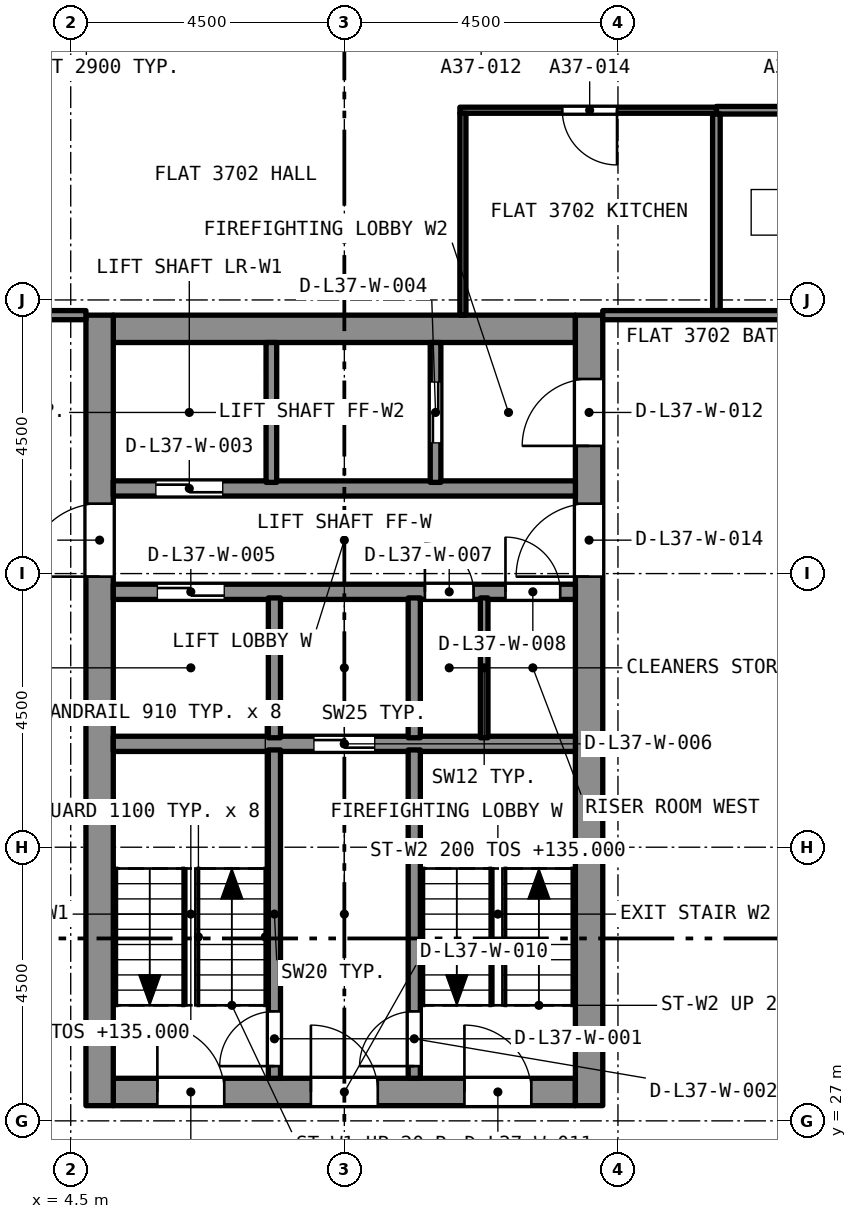
"""IFC4 building model, lengths in metres.
Left out: names, types, materials, properties, quantities, classifications, styles, units other than length and angle.
Written with IfcOpenShell. Run it as: python <this file> out.ifc"""

import sys

from ifc_helpers import new_model, si_unit, direction, frame, frame_2d, origin, place, context, subcontext, project, spatial, rectangle, extrude, element, fill, save


model = new_model("IFC4")
c1 = context("Model", 3, precision=1e-05, world=origin(), true_north=direction((0.0, 1.0)))
c2 = subcontext(c1, "Body", "Model", "MODEL_VIEW")
j1 = project(units=[si_unit("LENGTHUNIT", "METRE"), si_unit("PLANEANGLEUNIT", "RADIAN")], contexts=[c1])
p1 = place(None, origin())
s1 = spatial("IfcSite", under=j1, at=p1, CompositionType="ELEMENT")
p2 = place(p1, origin())
s2 = spatial("IfcBuilding", under=s1, at=p2, CompositionType="ELEMENT")
p3 = place(p2, frame((0.0, 0.0, 133.4)))
s3 = spatial("IfcBuildingStorey", under=s2, at=p3, CompositionType="ELEMENT", Elevation=133.4)
p4 = place(p3, frame((5.2, 27.475, 0.0), z_axis=(0.0, 0.0, 1.0), x_axis=(1.0, 0.0, 0.0)))
e1 = element("IfcWall", 1, at=p4, inside=s3, PredefinedType="SOLIDWALL", context=c2, shape_type="SweptSolid", body=[
    extrude(rectangle(XDim=7.6, YDim=0.45, at=frame_2d((3.8, 0.0))), origin(), (0.0, 0.0, 1.0), 3.2),
])
p5 = place(p4, frame((0.725, 0.0, 0.0)))
e2 = element("IfcOpeningElement", 2, at=p5, cuts=e1, PredefinedType="OPENING", context=c2, shape_type="SweptSolid", body=[
    extrude(rectangle(XDim=1.1, YDim=2.1, at=frame_2d((0.55, 1.05))), frame((0.0, 0.235, 0.0), z_axis=(0.0, -1.0, 0.0), x_axis=(1.0, 0.0, 0.0)), (0.0, 0.0, 1.0), 0.47),
])
p6 = place(p4, frame((3.25, 0.0, 0.0)))
e3 = element("IfcOpeningElement", 3, at=p6, cuts=e1, PredefinedType="OPENING", context=c2, shape_type="SweptSolid", body=[
    extrude(rectangle(XDim=1.1, YDim=2.1, at=frame_2d((0.55, 1.05))), frame((0.0, 0.235, 0.0), z_axis=(0.0, -1.0, 0.0), x_axis=(1.0, 0.0, 0.0)), (0.0, 0.0, 1.0), 0.47),
])
p7 = place(p4, frame((5.775, 0.0, 0.0)))
e4 = element("IfcOpeningElement", 4, at=p7, cuts=e1, PredefinedType="OPENING", context=c2, shape_type="SweptSolid", body=[
    extrude(rectangle(XDim=1.1, YDim=2.1, at=frame_2d((0.55, 1.05))), frame((0.0, 0.235, 0.0), z_axis=(0.0, -1.0, 0.0), x_axis=(1.0, 0.0, 0.0)), (0.0, 0.0, 1.0), 0.47),
])
p8 = place(p3, frame((5.2, 40.025, 0.0), z_axis=(0.0, 0.0, 1.0), x_axis=(1.0, 0.0, 0.0)))
e5 = element("IfcWall", 5, at=p8, inside=s3, PredefinedType="SOLIDWALL", context=c2, shape_type="SweptSolid", body=[
    extrude(rectangle(XDim=7.6, YDim=0.45, at=frame_2d((3.8, 0.0))), origin(), (0.0, 0.0, 1.0), 3.2),
])
p9 = place(p3, frame((4.975, 27.25, 0.0), z_axis=(0.0, 0.0, 1.0), x_axis=(0.0, 1.0, 0.0)))
e6 = element("IfcWall", 6, at=p9, inside=s3, PredefinedType="SOLIDWALL", context=c2, shape_type="SweptSolid", body=[
    extrude(rectangle(XDim=13.0, YDim=0.45, at=frame_2d((6.5, 0.0))), origin(), (0.0, 0.0, 1.0), 3.2),
])
p10 = place(p9, frame((8.7, 0.0, 0.0)))
e7 = element("IfcOpeningElement", 7, at=p10, cuts=e6, PredefinedType="OPENING", context=c2, shape_type="SweptSolid", body=[
    extrude(rectangle(XDim=1.2, YDim=2.1, at=frame_2d((0.6, 1.05))), frame((0.0, 0.235, 0.0), z_axis=(0.0, -1.0, 0.0), x_axis=(1.0, 0.0, 0.0)), (0.0, 0.0, 1.0), 0.47),
])
p11 = place(p3, frame((13.025, 27.25, 0.0), z_axis=(0.0, 0.0, 1.0), x_axis=(0.0, 1.0, 0.0)))
e8 = element("IfcWall", 8, at=p11, inside=s3, PredefinedType="SOLIDWALL", context=c2, shape_type="SweptSolid", body=[
    extrude(rectangle(XDim=13.0, YDim=0.45, at=frame_2d((6.5, 0.0))), origin(), (0.0, 0.0, 1.0), 3.2),
])
p12 = place(p11, frame((10.85, 0.0, 0.0)))
e9 = element("IfcOpeningElement", 9, at=p12, cuts=e8, PredefinedType="OPENING", context=c2, shape_type="SweptSolid", body=[
    extrude(rectangle(XDim=1.1, YDim=2.1, at=frame_2d((0.55, 1.05))), frame((0.0, 0.235, 0.0), z_axis=(0.0, -1.0, 0.0), x_axis=(1.0, 0.0, 0.0)), (0.0, 0.0, 1.0), 0.47),
])
p13 = place(p11, frame((8.7, 0.0, 0.0)))
e10 = element("IfcOpeningElement", 10, at=p13, cuts=e8, PredefinedType="OPENING", context=c2, shape_type="SweptSolid", body=[
    extrude(rectangle(XDim=1.2, YDim=2.1, at=frame_2d((0.6, 1.05))), frame((0.0, 0.235, 0.0), z_axis=(0.0, -1.0, 0.0), x_axis=(1.0, 0.0, 0.0)), (0.0, 0.0, 1.0), 0.47),
])
p14 = place(p3, frame((17.9, 43.62, 0.0), z_axis=(0.0, 0.0, 1.0), x_axis=(-1.0, 0.0, 0.0)))
e11 = element("IfcWall", 11, at=p14, inside=s3, PredefinedType="PARTITIONING", context=c2, shape_type="SweptSolid", body=[
    extrude(rectangle(XDim=2.781, YDim=0.125, at=frame_2d((1.39, 0.0))), origin(), (0.0, 0.0, 1.0), 2.9),
])
p15 = place(p14, frame((0.94, 0.0, 0.0)))
e12 = element("IfcOpeningElement", 12, at=p15, cuts=e11, PredefinedType="OPENING", context=c2, shape_type="SweptSolid", body=[
    extrude(rectangle(XDim=0.8, YDim=2.1, at=frame_2d((0.4, 1.05))), frame((0.0, 0.073, 0.0), z_axis=(0.0, -1.0, 0.0), x_axis=(1.0, 0.0, 0.0)), (0.0, 0.0, 1.0), 0.145),
])
p16 = place(p3, frame((15.119, 40.325, 0.0), z_axis=(0.0, 0.0, 1.0), x_axis=(0.0, 1.0, 0.0)))
e13 = element("IfcWall", 13, at=p16, inside=s3, PredefinedType="PARTITIONING", context=c2, shape_type="SweptSolid", body=[
    extrude(rectangle(XDim=3.233, YDim=0.125, at=frame_2d((1.616, 0.0))), origin(), (0.0, 0.0, 1.0), 2.9),
])
p17 = place(p3, frame((15.119, 43.62, 0.0), z_axis=(0.0, 0.0, 1.0), x_axis=(-1.0, 0.0, 0.0)))
e14 = element("IfcWall", 14, at=p17, inside=s3, PredefinedType="PARTITIONING", context=c2, shape_type="SweptSolid", body=[
    extrude(rectangle(XDim=4.219, YDim=0.1, at=frame_2d((2.11, 0.0))), origin(), (0.0, 0.0, 1.0), 2.9),
])
p18 = place(p17, frame((1.635, 0.0, 0.0)))
e15 = element("IfcOpeningElement", 15, at=p18, cuts=e14, PredefinedType="OPENING", context=c2, shape_type="SweptSolid", body=[
    extrude(rectangle(XDim=0.9, YDim=2.1, at=frame_2d((0.45, 1.05))), frame((0.0, 0.06, 0.0), z_axis=(0.0, -1.0, 0.0), x_axis=(1.0, 0.0, 0.0)), (0.0, 0.0, 1.0), 0.12),
])
p19 = place(p3, frame((10.95, 40.25, 0.0), z_axis=(0.0, 0.0, 1.0), x_axis=(0.0, 1.0, 0.0)))
e16 = element("IfcWall", 16, at=p19, inside=s3, PredefinedType="PARTITIONING", context=c2, shape_type="SweptSolid", body=[
    extrude(rectangle(XDim=3.32, YDim=0.1, at=frame_2d((1.66, 0.0))), origin(), (0.0, 0.0, 1.0), 2.9),
])
p20 = place(p3, frame((0.475, 40.25, 0.0), z_axis=(0.0, 0.0, 1.0), x_axis=(1.0, 0.0, 0.0)))
e17 = element("IfcWall", 17, at=p20, inside=s3, PredefinedType="PARTITIONING", context=c2, shape_type="SweptSolid", body=[
    extrude(rectangle(XDim=4.275, YDim=0.15, at=frame_2d((2.137, 0.0))), origin(), (0.0, 0.0, 1.0), 2.9),
])
p21 = place(p20, frame((1.275, 0.0, 0.0)))
e18 = element("IfcOpeningElement", 18, at=p21, cuts=e17, PredefinedType="OPENING", context=c2, shape_type="SweptSolid", body=[
    extrude(rectangle(XDim=1.0, YDim=2.1, at=frame_2d((0.5, 1.05))), frame((0.0, 0.085, 0.0), z_axis=(0.0, -1.0, 0.0), x_axis=(1.0, 0.0, 0.0)), (0.0, 0.0, 1.0), 0.17),
])
p22 = place(p3, frame((13.25, 40.25, 0.0), z_axis=(0.0, 0.0, 1.0), x_axis=(1.0, 0.0, 0.0)))
e19 = element("IfcWall", 19, at=p22, inside=s3, PredefinedType="PARTITIONING", context=c2, shape_type="SweptSolid", body=[
    extrude(rectangle(XDim=4.275, YDim=0.15, at=frame_2d((2.137, 0.0))), origin(), (0.0, 0.0, 1.0), 2.9),
])
p23 = place(p3, frame((5.2, 33.2, 0.0), z_axis=(0.0, 0.0, 1.0), x_axis=(1.0, 0.0, 0.0)))
e20 = element("IfcWall", 20, at=p23, inside=s3, PredefinedType="SOLIDWALL", context=c2, shape_type="SweptSolid", body=[
    extrude(rectangle(XDim=7.6, YDim=0.25, at=frame_2d((3.8, 0.0))), origin(), (0.0, 0.0, 1.0), 2.9),
])
p24 = place(p23, frame((3.3, 0.0, 0.0)))
e21 = element("IfcOpeningElement", 21, at=p24, cuts=e20, PredefinedType="OPENING", context=c2, shape_type="SweptSolid", body=[
    extrude(rectangle(XDim=1.0, YDim=2.1, at=frame_2d((0.5, 1.05))), frame((0.0, 0.135, 0.0), z_axis=(0.0, -1.0, 0.0), x_axis=(1.0, 0.0, 0.0)), (0.0, 0.0, 1.0), 0.27),
])
p25 = place(p3, frame((5.2, 35.7, 0.0), z_axis=(0.0, 0.0, 1.0), x_axis=(1.0, 0.0, 0.0)))
e22 = element("IfcWall", 22, at=p25, inside=s3, PredefinedType="SOLIDWALL", context=c2, shape_type="SweptSolid", body=[
    extrude(rectangle(XDim=7.6, YDim=0.25, at=frame_2d((3.8, 0.0))), origin(), (0.0, 0.0, 1.0), 2.9),
])
p26 = place(p25, frame((0.725, 0.0, 0.0)))
e23 = element("IfcOpeningElement", 23, at=p26, cuts=e22, PredefinedType="OPENING", context=c2, shape_type="SweptSolid", body=[
    extrude(rectangle(XDim=1.1, YDim=2.4, at=frame_2d((0.55, 1.2))), frame((0.0, 0.135, 0.0), z_axis=(0.0, -1.0, 0.0), x_axis=(1.0, 0.0, 0.0)), (0.0, 0.0, 1.0), 0.27),
])
p27 = place(p25, frame((5.125, 0.0, 0.0)))
e24 = element("IfcOpeningElement", 24, at=p27, cuts=e22, PredefinedType="OPENING", context=c2, shape_type="SweptSolid", body=[
    extrude(rectangle(XDim=0.8, YDim=2.1, at=frame_2d((0.4, 1.05))), frame((0.0, 0.135, 0.0), z_axis=(0.0, -1.0, 0.0), x_axis=(1.0, 0.0, 0.0)), (0.0, 0.0, 1.0), 0.27),
])
p28 = place(p25, frame((6.45, 0.0, 0.0)))
e25 = element("IfcOpeningElement", 25, at=p28, cuts=e22, PredefinedType="OPENING", context=c2, shape_type="SweptSolid", body=[
    extrude(rectangle(XDim=0.9, YDim=2.1, at=frame_2d((0.45, 1.05))), frame((0.0, 0.135, 0.0), z_axis=(0.0, -1.0, 0.0), x_axis=(1.0, 0.0, 0.0)), (0.0, 0.0, 1.0), 0.27),
])
p29 = place(p3, frame((5.2, 37.4, 0.0), z_axis=(0.0, 0.0, 1.0), x_axis=(1.0, 0.0, 0.0)))
e26 = element("IfcWall", 26, at=p29, inside=s3, PredefinedType="SOLIDWALL", context=c2, shape_type="SweptSolid", body=[
    extrude(rectangle(XDim=7.6, YDim=0.25, at=frame_2d((3.8, 0.0))), origin(), (0.0, 0.0, 1.0), 2.9),
])
p30 = place(p29, frame((0.7, 0.0, 0.0)))
e27 = element("IfcOpeningElement", 27, at=p30, cuts=e26, PredefinedType="OPENING", context=c2, shape_type="SweptSolid", body=[
    extrude(rectangle(XDim=1.1, YDim=2.4, at=frame_2d((0.55, 1.2))), frame((0.0, 0.135, 0.0), z_axis=(0.0, -1.0, 0.0), x_axis=(1.0, 0.0, 0.0)), (0.0, 0.0, 1.0), 0.27),
])
p31 = place(p3, frame((7.85, 27.7, 0.0), z_axis=(0.0, 0.0, 1.0), x_axis=(0.0, 1.0, 0.0)))
e28 = element("IfcWall", 28, at=p31, inside=s3, PredefinedType="SOLIDWALL", context=c2, shape_type="SweptSolid", body=[
    extrude(rectangle(XDim=5.4, YDim=0.2, at=frame_2d((2.7, 0.0))), origin(), (0.0, 0.0, 1.0), 2.9),
])
p32 = place(p31, frame((0.2, 0.0, 0.0)))
e29 = element("IfcOpeningElement", 29, at=p32, cuts=e28, PredefinedType="OPENING", context=c2, shape_type="SweptSolid", body=[
    extrude(rectangle(XDim=0.9, YDim=2.1, at=frame_2d((0.45, 1.05))), frame((0.0, 0.11, 0.0), z_axis=(0.0, -1.0, 0.0), x_axis=(1.0, 0.0, 0.0)), (0.0, 0.0, 1.0), 0.22),
])
p33 = place(p3, frame((10.15, 27.7, 0.0), z_axis=(0.0, 0.0, 1.0), x_axis=(0.0, 1.0, 0.0)))
e30 = element("IfcWall", 30, at=p33, inside=s3, PredefinedType="SOLIDWALL", context=c2, shape_type="SweptSolid", body=[
    extrude(rectangle(XDim=5.4, YDim=0.2, at=frame_2d((2.7, 0.0))), origin(), (0.0, 0.0, 1.0), 2.9),
])
p34 = place(p33, frame((0.2, 0.0, 0.0)))
e31 = element("IfcOpeningElement", 31, at=p34, cuts=e30, PredefinedType="OPENING", context=c2, shape_type="SweptSolid", body=[
    extrude(rectangle(XDim=0.9, YDim=2.1, at=frame_2d((0.45, 1.05))), frame((0.0, 0.11, 0.0), z_axis=(0.0, -1.0, 0.0), x_axis=(1.0, 0.0, 0.0)), (0.0, 0.0, 1.0), 0.22),
])
for number, where, z_axis, x_axis in (
    (32, (7.85, 33.3, 0.0), (0.0, 0.0, 1.0), (0.0, 1.0, 0.0)),
    (33, (10.15, 33.3, 0.0), (0.0, 0.0, 1.0), (0.0, 1.0, 0.0)),
):
    element("IfcWall", number, at=place(p3, frame(where, z_axis=z_axis, x_axis=x_axis)), inside=s3, PredefinedType="SOLIDWALL", context=c2, shape_type="SweptSolid", body=[
        extrude(rectangle(XDim=2.3, YDim=0.2, at=frame_2d((1.15, 0.0))), origin(), (0.0, 0.0, 1.0), 2.9),
    ])
p35 = place(p3, frame((7.8, 37.5, 0.0), z_axis=(0.0, 0.0, 1.0), x_axis=(0.0, 1.0, 0.0)))
e34 = element("IfcWall", 34, at=p35, inside=s3, PredefinedType="SOLIDWALL", context=c2, shape_type="SweptSolid", body=[
    extrude(rectangle(XDim=2.3, YDim=0.175, at=frame_2d((1.15, 0.0))), origin(), (0.0, 0.0, 1.0), 2.9),
])
p36 = place(p3, frame((10.5, 37.5, 0.0), z_axis=(0.0, 0.0, 1.0), x_axis=(0.0, 1.0, 0.0)))
e35 = element("IfcWall", 35, at=p36, inside=s3, PredefinedType="SOLIDWALL", context=c2, shape_type="SweptSolid", body=[
    extrude(rectangle(XDim=2.3, YDim=0.175, at=frame_2d((1.15, 0.0))), origin(), (0.0, 0.0, 1.0), 2.9),
])
p37 = place(p36, frame((0.65, 0.0, 0.0)))
e36 = element("IfcOpeningElement", 36, at=p37, cuts=e35, PredefinedType="OPENING", context=c2, shape_type="SweptSolid", body=[
    extrude(rectangle(XDim=1.0, YDim=2.1, at=frame_2d((0.5, 1.05))), frame((0.0, 0.097, 0.0), z_axis=(0.0, -1.0, 0.0), x_axis=(1.0, 0.0, 0.0)), (0.0, 0.0, 1.0), 0.195),
])
p38 = place(p3, frame((11.3, 33.3, 0.0), z_axis=(0.0, 0.0, 1.0), x_axis=(0.0, 1.0, 0.0)))
e37 = element("IfcWall", 37, at=p38, inside=s3, PredefinedType="PARTITIONING", context=c2, shape_type="SweptSolid", body=[
    extrude(rectangle(XDim=2.3, YDim=0.125, at=frame_2d((1.15, 0.0))), origin(), (0.0, 0.0, 1.0), 2.9),
])
p39 = place(p18, origin())
e38 = element("IfcDoor", 38, at=p39, inside=s3, OperationType="SINGLE_SWING_LEFT", PredefinedType="DOOR", context=c2, shape_type="SweptSolid", body=[
    extrude(rectangle(XDim=0.9, YDim=2.1, at=frame_2d((0.45, 1.05))), frame((0.0, 0.025, 0.0), z_axis=(0.0, -1.0, 0.0), x_axis=(1.0, 0.0, 0.0)), (0.0, 0.0, 1.0), 0.05),
])
fill(e15, e38)
p40 = place(p32, origin())
e39 = element("IfcDoor", 39, at=p40, inside=s3, OperationType="SINGLE_SWING_LEFT", PredefinedType="DOOR", context=c2, shape_type="SweptSolid", body=[
    extrude(rectangle(XDim=0.9, YDim=2.1, at=frame_2d((0.45, 1.05))), frame((0.0, 0.025, 0.0), z_axis=(0.0, -1.0, 0.0), x_axis=(1.0, 0.0, 0.0)), (0.0, 0.0, 1.0), 0.05),
])
fill(e29, e39)
p41 = place(p34, origin())
e40 = element("IfcDoor", 40, at=p41, inside=s3, OperationType="SINGLE_SWING_LEFT", PredefinedType="DOOR", context=c2, shape_type="SweptSolid", body=[
    extrude(rectangle(XDim=0.9, YDim=2.1, at=frame_2d((0.45, 1.05))), frame((0.0, 0.025, 0.0), z_axis=(0.0, -1.0, 0.0), x_axis=(1.0, 0.0, 0.0)), (0.0, 0.0, 1.0), 0.05),
])
fill(e31, e40)
p42 = place(p30, origin())
e41 = element("IfcDoor", 41, at=p42, inside=s3, OperationType="SLIDING_TO_LEFT", PredefinedType="DOOR", context=c2, shape_type="SweptSolid", body=[
    extrude(rectangle(XDim=1.1, YDim=2.4, at=frame_2d((0.55, 1.2))), frame((0.0, 0.025, 0.0), z_axis=(0.0, -1.0, 0.0), x_axis=(1.0, 0.0, 0.0)), (0.0, 0.0, 1.0), 0.05),
])
fill(e27, e41)
p43 = place(p37, origin())
e42 = element("IfcDoor", 42, at=p43, inside=s3, OperationType="SLIDING_TO_LEFT", PredefinedType="DOOR", context=c2, shape_type="SweptSolid", body=[
    extrude(rectangle(XDim=1.0, YDim=2.1, at=frame_2d((0.5, 1.05))), frame((0.0, 0.025, 0.0), z_axis=(0.0, -1.0, 0.0), x_axis=(1.0, 0.0, 0.0)), (0.0, 0.0, 1.0), 0.05),
])
fill(e36, e42)
p44 = place(p26, origin())
e43 = element("IfcDoor", 43, at=p44, inside=s3, OperationType="SLIDING_TO_LEFT", PredefinedType="DOOR", context=c2, shape_type="SweptSolid", body=[
    extrude(rectangle(XDim=1.1, YDim=2.4, at=frame_2d((0.55, 1.2))), frame((0.0, 0.025, 0.0), z_axis=(0.0, -1.0, 0.0), x_axis=(1.0, 0.0, 0.0)), (0.0, 0.0, 1.0), 0.05),
])
fill(e23, e43)
p45 = place(p24, origin())
e44 = element("IfcDoor", 44, at=p45, inside=s3, OperationType="SLIDING_TO_LEFT", PredefinedType="DOOR", context=c2, shape_type="SweptSolid", body=[
    extrude(rectangle(XDim=1.0, YDim=2.1, at=frame_2d((0.5, 1.05))), frame((0.0, 0.025, 0.0), z_axis=(0.0, -1.0, 0.0), x_axis=(1.0, 0.0, 0.0)), (0.0, 0.0, 1.0), 0.05),
])
fill(e21, e44)
p46 = place(p27, origin())
e45 = element("IfcDoor", 45, at=p46, inside=s3, OperationType="SINGLE_SWING_LEFT", PredefinedType="DOOR", context=c2, shape_type="SweptSolid", body=[
    extrude(rectangle(XDim=0.8, YDim=2.1, at=frame_2d((0.4, 1.05))), frame((0.0, 0.025, 0.0), z_axis=(0.0, -1.0, 0.0), x_axis=(1.0, 0.0, 0.0)), (0.0, 0.0, 1.0), 0.05),
])
fill(e24, e45)
p47 = place(p28, origin())
e46 = element("IfcDoor", 46, at=p47, inside=s3, OperationType="SINGLE_SWING_LEFT", PredefinedType="DOOR", context=c2, shape_type="SweptSolid", body=[
    extrude(rectangle(XDim=0.9, YDim=2.1, at=frame_2d((0.45, 1.05))), frame((0.0, 0.025, 0.0), z_axis=(0.0, -1.0, 0.0), x_axis=(1.0, 0.0, 0.0)), (0.0, 0.0, 1.0), 0.05),
])
fill(e25, e46)
p48 = place(p5, origin())
e47 = element("IfcDoor", 47, at=p48, inside=s3, OperationType="SINGLE_SWING_LEFT", PredefinedType="DOOR", context=c2, shape_type="SweptSolid", body=[
    extrude(rectangle(XDim=1.1, YDim=2.1, at=frame_2d((0.55, 1.05))), frame((0.0, 0.025, 0.0), z_axis=(0.0, -1.0, 0.0), x_axis=(1.0, 0.0, 0.0)), (0.0, 0.0, 1.0), 0.05),
])
fill(e2, e47)
p49 = place(p6, origin())
e48 = element("IfcDoor", 48, at=p49, inside=s3, OperationType="SINGLE_SWING_LEFT", PredefinedType="DOOR", context=c2, shape_type="SweptSolid", body=[
    extrude(rectangle(XDim=1.1, YDim=2.1, at=frame_2d((0.55, 1.05))), frame((0.0, 0.025, 0.0), z_axis=(0.0, -1.0, 0.0), x_axis=(1.0, 0.0, 0.0)), (0.0, 0.0, 1.0), 0.05),
])
fill(e3, e48)
p50 = place(p7, origin())
e49 = element("IfcDoor", 49, at=p50, inside=s3, OperationType="SINGLE_SWING_LEFT", PredefinedType="DOOR", context=c2, shape_type="SweptSolid", body=[
    extrude(rectangle(XDim=1.1, YDim=2.1, at=frame_2d((0.55, 1.05))), frame((0.0, 0.025, 0.0), z_axis=(0.0, -1.0, 0.0), x_axis=(1.0, 0.0, 0.0)), (0.0, 0.0, 1.0), 0.05),
])
fill(e4, e49)
p51 = place(p12, origin())
e50 = element("IfcDoor", 50, at=p51, inside=s3, OperationType="SINGLE_SWING_LEFT", PredefinedType="DOOR", context=c2, shape_type="SweptSolid", body=[
    extrude(rectangle(XDim=1.1, YDim=2.1, at=frame_2d((0.55, 1.05))), frame((0.0, 0.025, 0.0), z_axis=(0.0, -1.0, 0.0), x_axis=(1.0, 0.0, 0.0)), (0.0, 0.0, 1.0), 0.05),
])
fill(e9, e50)
p52 = place(p10, origin())
e51 = element("IfcDoor", 51, at=p52, inside=s3, OperationType="SINGLE_SWING_LEFT", PredefinedType="DOOR", context=c2, shape_type="SweptSolid", body=[
    extrude(rectangle(XDim=1.2, YDim=2.1, at=frame_2d((0.6, 1.05))), frame((0.0, 0.025, 0.0), z_axis=(0.0, -1.0, 0.0), x_axis=(1.0, 0.0, 0.0)), (0.0, 0.0, 1.0), 0.05),
])
fill(e7, e51)
p53 = place(p13, origin())
e52 = element("IfcDoor", 52, at=p53, inside=s3, OperationType="SINGLE_SWING_LEFT", PredefinedType="DOOR", context=c2, shape_type="SweptSolid", body=[
    extrude(rectangle(XDim=1.2, YDim=2.1, at=frame_2d((0.6, 1.05))), frame((0.0, 0.025, 0.0), z_axis=(0.0, -1.0, 0.0), x_axis=(1.0, 0.0, 0.0)), (0.0, 0.0, 1.0), 0.05),
])
fill(e10, e52)
save(model, sys.argv[1])
